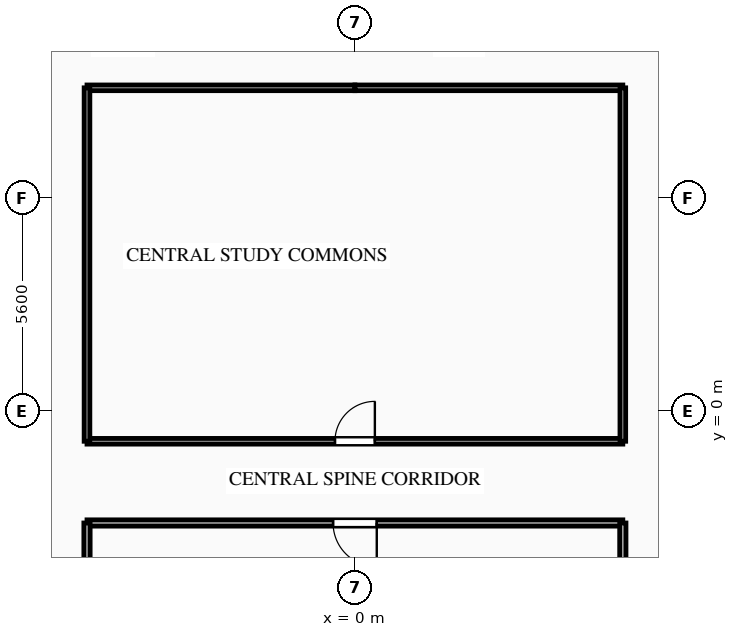
"""IFC4 building model, lengths in metres.
Left out: names, types, materials, properties, quantities, classifications, styles, units other than length and angle.
Written with IfcOpenShell. Run it as: python <this file> out.ifc"""

import sys

from ifc_helpers import new_model, si_unit, direction, frame, frame_2d, origin, place, context, subcontext, project, spatial, rectangle, extrude, element, fill, save


model = new_model("IFC4")
c1 = context("Model", 3, precision=1e-05, world=origin(), true_north=direction((0.0, 1.0)))
c2 = subcontext(c1, "Body", "Model", "MODEL_VIEW")
j1 = project(units=[si_unit("LENGTHUNIT", "METRE"), si_unit("PLANEANGLEUNIT", "RADIAN")], contexts=[c1])
p1 = place(None, origin())
s1 = spatial("IfcSite", under=j1, at=p1, CompositionType="ELEMENT")
p2 = place(p1, origin())
s2 = spatial("IfcBuilding", under=s1, at=p2, CompositionType="ELEMENT")
p3 = place(p2, frame((0.0, 0.0, 213.15)))
s3 = spatial("IfcBuildingStorey", under=s2, at=p3, CompositionType="ELEMENT", Elevation=213.15)
for number, where, z_axis, x_axis in (
    (1, (0.0, 8.5, 0.0), (0.0, 0.0, 1.0), (-1.0, 0.0, 0.0)),
    (2, (7.05, 8.5, 0.0), (0.0, 0.0, 1.0), (-1.0, 0.0, 0.0)),
):
    element("IfcWall", number, at=place(p3, frame(where, z_axis=z_axis, x_axis=x_axis)), inside=s3, PredefinedType="PARTITIONING", context=c2, shape_type="SweptSolid", body=[
        extrude(rectangle(XDim=7.05, YDim=0.15, at=frame_2d((3.525, 0.0))), origin(), (0.0, 0.0, 1.0), 3.04),
    ])
p4 = place(p3, frame((-7.05, -0.8, 0.0), z_axis=(0.0, 0.0, 1.0), x_axis=(1.0, 0.0, 0.0)))
e3 = element("IfcWall", 3, at=p4, inside=s3, PredefinedType="PARTITIONING", context=c2, shape_type="SweptSolid", body=[
    extrude(rectangle(XDim=14.1, YDim=0.15, at=frame_2d((7.05, 0.0))), origin(), (0.0, 0.0, 1.0), 3.04),
])
p5 = place(p4, frame((6.525, 0.0, 0.0)))
e4 = element("IfcOpeningElement", 4, at=p5, cuts=e3, PredefinedType="OPENING", context=c2, shape_type="SweptSolid", body=[
    extrude(rectangle(XDim=1.05, YDim=2.15, at=frame_2d((0.525, 1.075))), frame((0.0, 0.085, 0.0), z_axis=(0.0, -1.0, 0.0), x_axis=(1.0, 0.0, 0.0)), (0.0, 0.0, 1.0), 0.17),
])
p6 = place(p3, frame((7.05, -2.95, 0.0), z_axis=(0.0, 0.0, 1.0), x_axis=(-1.0, 0.0, 0.0)))
e5 = element("IfcWall", 5, at=p6, inside=s3, PredefinedType="PARTITIONING", context=c2, shape_type="SweptSolid", body=[
    extrude(rectangle(XDim=14.1, YDim=0.165, at=frame_2d((7.05, 0.0))), origin(), (0.0, 0.0, 1.0), 3.04),
])
p7 = place(p6, frame((6.475, 0.0, 0.0)))
e6 = element("IfcOpeningElement", 6, at=p7, cuts=e5, PredefinedType="OPENING", context=c2, shape_type="SweptSolid", body=[
    extrude(rectangle(XDim=1.15, YDim=2.15, at=frame_2d((0.575, 1.075))), frame((0.0, 0.093, 0.0), z_axis=(0.0, -1.0, 0.0), x_axis=(1.0, 0.0, 0.0)), (0.0, 0.0, 1.0), 0.185),
])
p8 = place(p3, frame((-7.05, 8.5, 0.0), z_axis=(0.0, 0.0, 1.0), x_axis=(0.0, -1.0, 0.0)))
e7 = element("IfcWall", 7, at=p8, inside=s3, PredefinedType="PARTITIONING", context=c2, shape_type="SweptSolid", body=[
    extrude(rectangle(XDim=9.3, YDim=0.15, at=frame_2d((4.65, 0.0))), origin(), (0.0, 0.0, 1.0), 3.04),
])
p9 = place(p3, frame((-7.05, -2.95, 0.0), z_axis=(0.0, 0.0, 1.0), x_axis=(0.0, -1.0, 0.0)))
e8 = element("IfcWall", 8, at=p9, inside=s3, PredefinedType="PARTITIONING", context=c2, shape_type="SweptSolid", body=[
    extrude(rectangle(XDim=2.65, YDim=0.165, at=frame_2d((1.325, 0.0))), origin(), (0.0, 0.0, 1.0), 3.04),
])
p10 = place(p3, frame((7.05, -0.8, 0.0), z_axis=(0.0, 0.0, 1.0), x_axis=(0.0, 1.0, 0.0)))
e9 = element("IfcWall", 9, at=p10, inside=s3, PredefinedType="PARTITIONING", context=c2, shape_type="SweptSolid", body=[
    extrude(rectangle(XDim=9.3, YDim=0.15, at=frame_2d((4.65, 0.0))), origin(), (0.0, 0.0, 1.0), 3.04),
])
p11 = place(p3, frame((7.05, -5.6, 0.0), z_axis=(0.0, 0.0, 1.0), x_axis=(0.0, 1.0, 0.0)))
e10 = element("IfcWall", 10, at=p11, inside=s3, PredefinedType="PARTITIONING", context=c2, shape_type="SweptSolid", body=[
    extrude(rectangle(XDim=2.65, YDim=0.165, at=frame_2d((1.325, 0.0))), origin(), (0.0, 0.0, 1.0), 3.04),
])
p12 = place(p5, origin())
e11 = element("IfcDoor", 11, at=p12, inside=s3, OperationType="SINGLE_SWING_RIGHT", PredefinedType="DOOR", context=c2, shape_type="SweptSolid", body=[
    extrude(rectangle(XDim=1.05, YDim=2.15, at=frame_2d((0.525, 1.075))), frame((0.0, 0.025, 0.0), z_axis=(0.0, -1.0, 0.0), x_axis=(1.0, 0.0, 0.0)), (0.0, 0.0, 1.0), 0.05),
])
fill(e4, e11)
p13 = place(p7, origin())
e12 = element("IfcDoor", 12, at=p13, inside=s3, OperationType="SINGLE_SWING_LEFT", PredefinedType="DOOR", context=c2, shape_type="SweptSolid", body=[
    extrude(rectangle(XDim=1.15, YDim=2.15, at=frame_2d((0.575, 1.075))), frame((0.0, 0.025, 0.0), z_axis=(0.0, -1.0, 0.0), x_axis=(1.0, 0.0, 0.0)), (0.0, 0.0, 1.0), 0.05),
])
fill(e6, e12)
save(model, sys.argv[1])
